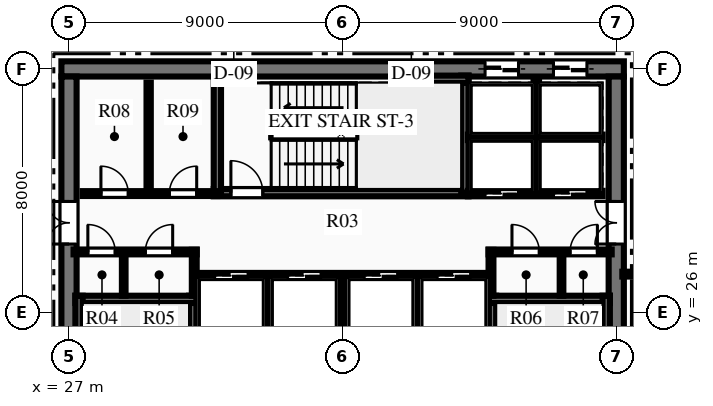
"""IFC4 building model, lengths in metres.
Left out: names, types, materials, properties, quantities, classifications, styles, units other than length and angle.
Written with IfcOpenShell. Run it as: python <this file> out.ifc"""

import sys

from ifc_helpers import new_model, si_unit, direction, frame, frame_2d, origin, place, context, subcontext, project, spatial, rectangle, extrude, element, fill, save


model = new_model("IFC4")
c1 = context("Model", 3, precision=1e-05, world=origin(), true_north=direction((0.0, 1.0)))
c2 = subcontext(c1, "Body", "Model", "MODEL_VIEW")
j1 = project(units=[si_unit("LENGTHUNIT", "METRE"), si_unit("PLANEANGLEUNIT", "RADIAN")], contexts=[c1])
p1 = place(None, origin())
s1 = spatial("IfcSite", under=j1, at=p1, CompositionType="ELEMENT")
p2 = place(p1, origin())
s2 = spatial("IfcBuilding", under=s1, at=p2, CompositionType="ELEMENT")
p3 = place(p2, frame((0.0, 0.0, 181.95)))
s3 = spatial("IfcBuildingStorey", under=s2, at=p3, CompositionType="ELEMENT", Elevation=181.95)
p4 = place(p3, frame((26.75, 34.0, 0.0), z_axis=(0.0, 0.0, 1.0), x_axis=(1.0, 0.0, 0.0)))
e1 = element("IfcWall", 1, at=p4, inside=s3, PredefinedType="SHEAR", context=c2, shape_type="SweptSolid", body=[
    extrude(rectangle(XDim=18.5, YDim=0.5, at=frame_2d((9.25, 0.0))), origin(), (0.0, 0.0, 1.0), 3.75),
])
p5 = place(p4, frame((13.935, 0.0, 0.0)))
e2 = element("IfcOpeningElement", 2, at=p5, cuts=e1, PredefinedType="OPENING", context=c2, shape_type="SweptSolid", body=[
    extrude(rectangle(XDim=1.1, YDim=2.15, at=frame_2d((0.55, 1.075))), frame((0.0, 0.26, 0.0), z_axis=(0.0, -1.0, 0.0), x_axis=(1.0, 0.0, 0.0)), (0.0, 0.0, 1.0), 0.52),
])
p6 = place(p4, frame((16.185, 0.0, 0.0)))
e3 = element("IfcOpeningElement", 3, at=p6, cuts=e1, PredefinedType="OPENING", context=c2, shape_type="SweptSolid", body=[
    extrude(rectangle(XDim=1.1, YDim=2.15, at=frame_2d((0.55, 1.075))), frame((0.0, 0.26, 0.0), z_axis=(0.0, -1.0, 0.0), x_axis=(1.0, 0.0, 0.0)), (0.0, 0.0, 1.0), 0.52),
])
p7 = place(p3, frame((27.0, 18.25, 0.0), z_axis=(0.0, 0.0, 1.0), x_axis=(0.0, 1.0, 0.0)))
e4 = element("IfcWall", 4, at=p7, inside=s3, PredefinedType="SHEAR", context=c2, shape_type="SweptSolid", body=[
    extrude(rectangle(XDim=15.5, YDim=0.5, at=frame_2d((7.75, 0.0))), origin(), (0.0, 0.0, 1.0), 3.75),
])
p8 = place(p7, frame((9.99, 0.0, 0.0)))
e5 = element("IfcOpeningElement", 5, at=p8, cuts=e4, PredefinedType="OPENING", context=c2, shape_type="SweptSolid", body=[
    extrude(rectangle(XDim=1.4, YDim=2.2, at=frame_2d((0.7, 1.1))), frame((0.0, 0.26, 0.0), z_axis=(0.0, -1.0, 0.0), x_axis=(1.0, 0.0, 0.0)), (0.0, 0.0, 1.0), 0.52),
])
p9 = place(p3, frame((45.0, 18.25, 0.0), z_axis=(0.0, 0.0, 1.0), x_axis=(0.0, 1.0, 0.0)))
e6 = element("IfcWall", 6, at=p9, inside=s3, PredefinedType="SHEAR", context=c2, shape_type="SweptSolid", body=[
    extrude(rectangle(XDim=15.5, YDim=0.5, at=frame_2d((7.75, 0.0))), origin(), (0.0, 0.0, 1.0), 3.75),
])
p10 = place(p9, frame((9.99, 0.0, 0.0)))
e7 = element("IfcOpeningElement", 7, at=p10, cuts=e6, PredefinedType="OPENING", context=c2, shape_type="SweptSolid", body=[
    extrude(rectangle(XDim=1.4, YDim=2.2, at=frame_2d((0.7, 1.1))), frame((0.0, 0.26, 0.0), z_axis=(0.0, -1.0, 0.0), x_axis=(1.0, 0.0, 0.0)), (0.0, 0.0, 1.0), 0.52),
])
p11 = place(p3, frame((31.07, 18.28, 0.0), z_axis=(0.0, 0.0, 1.0), x_axis=(0.0, 1.0, 0.0)))
e8 = element("IfcWall", 8, at=p11, inside=s3, PredefinedType="SHEAR", context=c2, shape_type="SweptSolid", body=[
    extrude(rectangle(XDim=8.26, YDim=0.24, at=frame_2d((4.13, 0.0))), origin(), (0.0, 0.0, 1.0), 3.75),
])
p12 = place(p11, frame((0.365, 0.0, 0.0)))
e9 = element("IfcOpeningElement", 9, at=p12, cuts=e8, PredefinedType="OPENING", context=c2, shape_type="SweptSolid", body=[
    extrude(rectangle(XDim=1.05, YDim=2.15, at=frame_2d((0.525, 1.075))), frame((0.0, 0.13, 0.0), z_axis=(0.0, -1.0, 0.0), x_axis=(1.0, 0.0, 0.0)), (0.0, 0.0, 1.0), 0.26),
])
p13 = place(p3, frame((27.21, 26.42, 0.0), z_axis=(0.0, 0.0, 1.0), x_axis=(1.0, 0.0, 0.0)))
e10 = element("IfcWall", 10, at=p13, inside=s3, PredefinedType="SHEAR", context=c2, shape_type="SweptSolid", body=[
    extrude(rectangle(XDim=3.98, YDim=0.24, at=frame_2d((1.99, 0.0))), origin(), (0.0, 0.0, 1.0), 3.75),
])
p14 = place(p3, frame((27.33, 18.28, 0.0), z_axis=(0.0, 0.0, 1.0), x_axis=(0.0, 1.0, 0.0)))
e11 = element("IfcWall", 11, at=p14, inside=s3, PredefinedType="SHEAR", context=c2, shape_type="SweptSolid", body=[
    extrude(rectangle(XDim=8.26, YDim=0.24, at=frame_2d((4.13, 0.0))), origin(), (0.0, 0.0, 1.0), 3.75),
])
p15 = place(p3, frame((40.93, 18.28, 0.0), z_axis=(0.0, 0.0, 1.0), x_axis=(0.0, 1.0, 0.0)))
e12 = element("IfcWall", 12, at=p15, inside=s3, PredefinedType="SHEAR", context=c2, shape_type="SweptSolid", body=[
    extrude(rectangle(XDim=8.26, YDim=0.24, at=frame_2d((4.13, 0.0))), origin(), (0.0, 0.0, 1.0), 3.75),
])
p16 = place(p15, frame((0.365, 0.0, 0.0)))
e13 = element("IfcOpeningElement", 13, at=p16, cuts=e12, PredefinedType="OPENING", context=c2, shape_type="SweptSolid", body=[
    extrude(rectangle(XDim=1.05, YDim=2.15, at=frame_2d((0.525, 1.075))), frame((0.0, 0.13, 0.0), z_axis=(0.0, -1.0, 0.0), x_axis=(1.0, 0.0, 0.0)), (0.0, 0.0, 1.0), 0.26),
])
p17 = place(p3, frame((40.81, 26.42, 0.0), z_axis=(0.0, 0.0, 1.0), x_axis=(1.0, 0.0, 0.0)))
e14 = element("IfcWall", 14, at=p17, inside=s3, PredefinedType="SHEAR", context=c2, shape_type="SweptSolid", body=[
    extrude(rectangle(XDim=3.98, YDim=0.24, at=frame_2d((1.99, 0.0))), origin(), (0.0, 0.0, 1.0), 3.75),
])
p18 = place(p3, frame((44.67, 18.28, 0.0), z_axis=(0.0, 0.0, 1.0), x_axis=(0.0, 1.0, 0.0)))
e15 = element("IfcWall", 15, at=p18, inside=s3, PredefinedType="SHEAR", context=c2, shape_type="SweptSolid", body=[
    extrude(rectangle(XDim=8.26, YDim=0.24, at=frame_2d((4.13, 0.0))), origin(), (0.0, 0.0, 1.0), 3.75),
])
p19 = place(p3, frame((31.76, 29.93, 0.0), z_axis=(0.0, 0.0, 1.0), x_axis=(1.0, 0.0, 0.0)))
e16 = element("IfcWall", 16, at=p19, inside=s3, PredefinedType="SHEAR", context=c2, shape_type="SweptSolid", body=[
    extrude(rectangle(XDim=8.38, YDim=0.24, at=frame_2d((4.19, 0.0))), origin(), (0.0, 0.0, 1.0), 3.75),
])
p20 = place(p19, frame((0.565, 0.0, 0.0)))
e17 = element("IfcOpeningElement", 17, at=p20, cuts=e16, PredefinedType="OPENING", context=c2, shape_type="SweptSolid", body=[
    extrude(rectangle(XDim=1.05, YDim=2.15, at=frame_2d((0.525, 1.075))), frame((0.0, 0.13, 0.0), z_axis=(0.0, -1.0, 0.0), x_axis=(1.0, 0.0, 0.0)), (0.0, 0.0, 1.0), 0.26),
])
p21 = place(p3, frame((31.88, 29.93, 0.0), z_axis=(0.0, 0.0, 1.0), x_axis=(0.0, 1.0, 0.0)))
e18 = element("IfcWall", 18, at=p21, inside=s3, PredefinedType="SHEAR", context=c2, shape_type="SweptSolid", body=[
    extrude(rectangle(XDim=3.79, YDim=0.24, at=frame_2d((1.895, 0.0))), origin(), (0.0, 0.0, 1.0), 3.75),
])
p22 = place(p3, frame((40.02, 29.93, 0.0), z_axis=(0.0, 0.0, 1.0), x_axis=(0.0, 1.0, 0.0)))
e19 = element("IfcWall", 19, at=p22, inside=s3, PredefinedType="SHEAR", context=c2, shape_type="SweptSolid", body=[
    extrude(rectangle(XDim=3.85, YDim=0.24, at=frame_2d((1.925, 0.0))), origin(), (0.0, 0.0, 1.0), 3.75),
])
p23 = place(p3, frame((37.85, 33.66, 0.0), z_axis=(0.0, 0.0, 1.0), x_axis=(1.0, 0.0, 0.0)))
e20 = element("IfcWall", 20, at=p23, inside=s3, PredefinedType="SHEAR", context=c2, shape_type="SweptSolid", body=[
    extrude(rectangle(XDim=2.29, YDim=0.24, at=frame_2d((1.145, 0.0))), origin(), (0.0, 0.0, 1.0), 3.75),
])
p24 = place(p3, frame((27.15, 27.98, 0.0), z_axis=(0.0, 0.0, 1.0), x_axis=(1.0, 0.0, 0.0)))
e21 = element("IfcWall", 21, at=p24, inside=s3, PredefinedType="PARTITIONING", context=c2, shape_type="SweptSolid", body=[
    extrude(rectangle(XDim=4.05, YDim=0.16, at=frame_2d((2.025, 0.0))), origin(), (0.0, 0.0, 1.0), 3.46),
])
p25 = place(p24, frame((0.47, 0.0, 0.0)))
e22 = element("IfcOpeningElement", 22, at=p25, cuts=e21, PredefinedType="OPENING", context=c2, shape_type="SweptSolid", body=[
    extrude(rectangle(XDim=0.9, YDim=2.15, at=frame_2d((0.45, 1.075))), frame((0.0, 0.09, 0.0), z_axis=(0.0, -1.0, 0.0), x_axis=(1.0, 0.0, 0.0)), (0.0, 0.0, 1.0), 0.18),
])
p26 = place(p24, frame((2.36, 0.0, 0.0)))
e23 = element("IfcOpeningElement", 23, at=p26, cuts=e21, PredefinedType="OPENING", context=c2, shape_type="SweptSolid", body=[
    extrude(rectangle(XDim=0.9, YDim=2.15, at=frame_2d((0.45, 1.075))), frame((0.0, 0.09, 0.0), z_axis=(0.0, -1.0, 0.0), x_axis=(1.0, 0.0, 0.0)), (0.0, 0.0, 1.0), 0.18),
])
p27 = place(p3, frame((31.12, 26.54, 0.0), z_axis=(0.0, 0.0, 1.0), x_axis=(0.0, 1.0, 0.0)))
e24 = element("IfcWall", 24, at=p27, inside=s3, PredefinedType="PARTITIONING", context=c2, shape_type="SweptSolid", body=[
    extrude(rectangle(XDim=1.51, YDim=0.16, at=frame_2d((0.755, 0.0))), origin(), (0.0, 0.0, 1.0), 3.46),
])
p28 = place(p3, frame((40.8, 27.98, 0.0), z_axis=(0.0, 0.0, 1.0), x_axis=(1.0, 0.0, 0.0)))
e25 = element("IfcWall", 25, at=p28, inside=s3, PredefinedType="PARTITIONING", context=c2, shape_type="SweptSolid", body=[
    extrude(rectangle(XDim=4.05, YDim=0.16, at=frame_2d((2.025, 0.0))), origin(), (0.0, 0.0, 1.0), 3.46),
])
p29 = place(p28, frame((0.77, 0.0, 0.0)))
e26 = element("IfcOpeningElement", 26, at=p29, cuts=e25, PredefinedType="OPENING", context=c2, shape_type="SweptSolid", body=[
    extrude(rectangle(XDim=0.9, YDim=2.15, at=frame_2d((0.45, 1.075))), frame((0.0, 0.09, 0.0), z_axis=(0.0, -1.0, 0.0), x_axis=(1.0, 0.0, 0.0)), (0.0, 0.0, 1.0), 0.18),
])
p30 = place(p28, frame((2.68, 0.0, 0.0)))
e27 = element("IfcOpeningElement", 27, at=p30, cuts=e25, PredefinedType="OPENING", context=c2, shape_type="SweptSolid", body=[
    extrude(rectangle(XDim=0.9, YDim=2.15, at=frame_2d((0.45, 1.075))), frame((0.0, 0.09, 0.0), z_axis=(0.0, -1.0, 0.0), x_axis=(1.0, 0.0, 0.0)), (0.0, 0.0, 1.0), 0.18),
])
p31 = place(p3, frame((40.88, 26.54, 0.0), z_axis=(0.0, 0.0, 1.0), x_axis=(0.0, 1.0, 0.0)))
e28 = element("IfcWall", 28, at=p31, inside=s3, PredefinedType="PARTITIONING", context=c2, shape_type="SweptSolid", body=[
    extrude(rectangle(XDim=1.51, YDim=0.16, at=frame_2d((0.755, 0.0))), origin(), (0.0, 0.0, 1.0), 3.46),
])
for number, where, z_axis, x_axis in (
    (29, (28.8, 26.54, 0.0), (0.0, 0.0, 1.0), (0.0, 1.0, 0.0)),
    (30, (43.2, 26.54, 0.0), (0.0, 0.0, 1.0), (0.0, 1.0, 0.0)),
):
    element("IfcWall", number, at=place(p3, frame(where, z_axis=z_axis, x_axis=x_axis)), inside=s3, PredefinedType="PARTITIONING", context=c2, shape_type="SweptSolid", body=[
        extrude(rectangle(XDim=1.44, YDim=0.12, at=frame_2d((0.72, 0.0))), origin(), (0.0, 0.0, 1.0), 3.46),
    ])
p32 = place(p3, frame((27.45, 29.9, 0.0), z_axis=(0.0, 0.0, 1.0), x_axis=(1.0, 0.0, 0.0)))
e31 = element("IfcWall", 31, at=p32, inside=s3, PredefinedType="PARTITIONING", context=c2, shape_type="SweptSolid", body=[
    extrude(rectangle(XDim=4.43, YDim=0.16, at=frame_2d((2.215, 0.0))), origin(), (0.0, 0.0, 1.0), 3.46),
])
p33 = place(p32, frame((0.6, 0.0, 0.0)))
e32 = element("IfcOpeningElement", 32, at=p33, cuts=e31, PredefinedType="OPENING", context=c2, shape_type="SweptSolid", body=[
    extrude(rectangle(XDim=0.9, YDim=2.15, at=frame_2d((0.45, 1.075))), frame((0.0, 0.09, 0.0), z_axis=(0.0, -1.0, 0.0), x_axis=(1.0, 0.0, 0.0)), (0.0, 0.0, 1.0), 0.18),
])
p34 = place(p32, frame((2.85, 0.0, 0.0)))
e33 = element("IfcOpeningElement", 33, at=p34, cuts=e31, PredefinedType="OPENING", context=c2, shape_type="SweptSolid", body=[
    extrude(rectangle(XDim=0.9, YDim=2.15, at=frame_2d((0.45, 1.075))), frame((0.0, 0.09, 0.0), z_axis=(0.0, -1.0, 0.0), x_axis=(1.0, 0.0, 0.0)), (0.0, 0.0, 1.0), 0.18),
])
p35 = place(p3, frame((29.62, 29.95, 0.0), z_axis=(0.0, 0.0, 1.0), x_axis=(0.0, 1.0, 0.0)))
e34 = element("IfcWall", 34, at=p35, inside=s3, PredefinedType="PARTITIONING", context=c2, shape_type="SweptSolid", body=[
    extrude(rectangle(XDim=3.6, YDim=0.14, at=frame_2d((1.8, 0.0))), origin(), (0.0, 0.0, 1.0), 3.46),
])
p36 = place(p3, frame((40.12, 29.9, 0.0), z_axis=(0.0, 0.0, 1.0), x_axis=(1.0, 0.0, 0.0)))
e35 = element("IfcWall", 35, at=p36, inside=s3, PredefinedType="PARTITIONING", context=c2, shape_type="SweptSolid", body=[
    extrude(rectangle(XDim=4.43, YDim=0.18, at=frame_2d((2.215, 0.0))), origin(), (0.0, 0.0, 1.0), 3.46),
])
p37 = place(p36, frame((0.565, 0.0, 0.0)))
e36 = element("IfcOpeningElement", 36, at=p37, cuts=e35, PredefinedType="OPENING", context=c2, shape_type="SweptSolid", body=[
    extrude(rectangle(XDim=1.1, YDim=2.15, at=frame_2d((0.55, 1.075))), frame((0.0, 0.1, 0.0), z_axis=(0.0, -1.0, 0.0), x_axis=(1.0, 0.0, 0.0)), (0.0, 0.0, 1.0), 0.2),
])
p38 = place(p36, frame((2.815, 0.0, 0.0)))
e37 = element("IfcOpeningElement", 37, at=p38, cuts=e35, PredefinedType="OPENING", context=c2, shape_type="SweptSolid", body=[
    extrude(rectangle(XDim=1.1, YDim=2.15, at=frame_2d((0.55, 1.075))), frame((0.0, 0.1, 0.0), z_axis=(0.0, -1.0, 0.0), x_axis=(1.0, 0.0, 0.0)), (0.0, 0.0, 1.0), 0.2),
])
p39 = place(p3, frame((40.12, 31.75, 0.0), z_axis=(0.0, 0.0, 1.0), x_axis=(1.0, 0.0, 0.0)))
e38 = element("IfcWall", 38, at=p39, inside=s3, PredefinedType="PARTITIONING", context=c2, shape_type="SweptSolid", body=[
    extrude(rectangle(XDim=4.43, YDim=0.18, at=frame_2d((2.215, 0.0))), origin(), (0.0, 0.0, 1.0), 3.46),
])
p40 = place(p3, frame((42.37, 29.9, 0.0), z_axis=(0.0, 0.0, 1.0), x_axis=(0.0, 1.0, 0.0)))
e39 = element("IfcWall", 39, at=p40, inside=s3, PredefinedType="PARTITIONING", context=c2, shape_type="SweptSolid", body=[
    extrude(rectangle(XDim=3.75, YDim=0.18, at=frame_2d((1.875, 0.0))), origin(), (0.0, 0.0, 1.0), 3.46),
])
p41 = place(p3, frame((31.2, 27.2, 0.0), z_axis=(0.0, 0.0, 1.0), x_axis=(1.0, 0.0, 0.0)))
e40 = element("IfcWall", 40, at=p41, inside=s3, PredefinedType="PARTITIONING", context=c2, shape_type="SweptSolid", body=[
    extrude(rectangle(XDim=9.6, YDim=0.18, at=frame_2d((4.8, 0.0))), origin(), (0.0, 0.0, 1.0), 3.46),
])
p42 = place(p41, frame((0.59, 0.0, 0.0)))
e41 = element("IfcOpeningElement", 41, at=p42, cuts=e40, PredefinedType="OPENING", context=c2, shape_type="SweptSolid", body=[
    extrude(rectangle(XDim=1.1, YDim=2.15, at=frame_2d((0.55, 1.075))), frame((0.0, 0.1, 0.0), z_axis=(0.0, -1.0, 0.0), x_axis=(1.0, 0.0, 0.0)), (0.0, 0.0, 1.0), 0.2),
])
p43 = place(p41, frame((2.99, 0.0, 0.0)))
e42 = element("IfcOpeningElement", 42, at=p43, cuts=e40, PredefinedType="OPENING", context=c2, shape_type="SweptSolid", body=[
    extrude(rectangle(XDim=1.1, YDim=2.15, at=frame_2d((0.55, 1.075))), frame((0.0, 0.1, 0.0), z_axis=(0.0, -1.0, 0.0), x_axis=(1.0, 0.0, 0.0)), (0.0, 0.0, 1.0), 0.2),
])
p44 = place(p41, frame((5.51, 0.0, 0.0)))
e43 = element("IfcOpeningElement", 43, at=p44, cuts=e40, PredefinedType="OPENING", context=c2, shape_type="SweptSolid", body=[
    extrude(rectangle(XDim=1.1, YDim=2.15, at=frame_2d((0.55, 1.075))), frame((0.0, 0.1, 0.0), z_axis=(0.0, -1.0, 0.0), x_axis=(1.0, 0.0, 0.0)), (0.0, 0.0, 1.0), 0.2),
])
p45 = place(p41, frame((7.91, 0.0, 0.0)))
e44 = element("IfcOpeningElement", 44, at=p45, cuts=e40, PredefinedType="OPENING", context=c2, shape_type="SweptSolid", body=[
    extrude(rectangle(XDim=1.1, YDim=2.15, at=frame_2d((0.55, 1.075))), frame((0.0, 0.1, 0.0), z_axis=(0.0, -1.0, 0.0), x_axis=(1.0, 0.0, 0.0)), (0.0, 0.0, 1.0), 0.2),
])
for number, where, z_axis, x_axis in (
    (45, (33.54, 25.3, 0.0), (0.0, 0.0, 1.0), (0.0, 1.0, 0.0)),
    (46, (36.0, 25.3, 0.0), (0.0, 0.0, 1.0), (0.0, 1.0, 0.0)),
    (47, (38.46, 25.3, 0.0), (0.0, 0.0, 1.0), (0.0, 1.0, 0.0)),
):
    element("IfcWall", number, at=place(p3, frame(where, z_axis=z_axis, x_axis=x_axis)), inside=s3, PredefinedType="PARTITIONING", context=c2, shape_type="SweptSolid", body=[
        extrude(rectangle(XDim=1.9, YDim=0.18, at=frame_2d((0.95, 0.0))), origin(), (0.0, 0.0, 1.0), 3.46),
    ])
p46 = place(p3, frame((45.2, 27.25, 0.0), z_axis=(0.0, 0.0, 1.0), x_axis=(1.0, 0.0, 0.0)))
e48 = element("IfcWall", 48, at=p46, inside=s3, PredefinedType="PARTITIONING", context=c2, shape_type="SweptSolid", body=[
    extrude(rectangle(XDim=2.25, YDim=0.16, at=frame_2d((1.125, 0.0))), origin(), (0.0, 0.0, 1.0), 3.46),
])
p47 = place(p25, origin())
e49 = element("IfcDoor", 49, at=p47, inside=s3, OperationType="SINGLE_SWING_LEFT", PredefinedType="DOOR", context=c2, shape_type="SweptSolid", body=[
    extrude(rectangle(XDim=0.9, YDim=2.15, at=frame_2d((0.45, 1.075))), frame((0.0, 0.025, 0.0), z_axis=(0.0, -1.0, 0.0), x_axis=(1.0, 0.0, 0.0)), (0.0, 0.0, 1.0), 0.05),
])
fill(e22, e49)
p48 = place(p26, origin())
e50 = element("IfcDoor", 50, at=p48, inside=s3, OperationType="SINGLE_SWING_RIGHT", PredefinedType="DOOR", context=c2, shape_type="SweptSolid", body=[
    extrude(rectangle(XDim=0.9, YDim=2.15, at=frame_2d((0.45, 1.075))), frame((0.0, 0.025, 0.0), z_axis=(0.0, -1.0, 0.0), x_axis=(1.0, 0.0, 0.0)), (0.0, 0.0, 1.0), 0.05),
])
fill(e23, e50)
p49 = place(p29, origin())
e51 = element("IfcDoor", 51, at=p49, inside=s3, OperationType="SINGLE_SWING_LEFT", PredefinedType="DOOR", context=c2, shape_type="SweptSolid", body=[
    extrude(rectangle(XDim=0.9, YDim=2.15, at=frame_2d((0.45, 1.075))), frame((0.0, 0.025, 0.0), z_axis=(0.0, -1.0, 0.0), x_axis=(1.0, 0.0, 0.0)), (0.0, 0.0, 1.0), 0.05),
])
fill(e26, e51)
p50 = place(p30, origin())
e52 = element("IfcDoor", 52, at=p50, inside=s3, OperationType="SINGLE_SWING_RIGHT", PredefinedType="DOOR", context=c2, shape_type="SweptSolid", body=[
    extrude(rectangle(XDim=0.9, YDim=2.15, at=frame_2d((0.45, 1.075))), frame((0.0, 0.025, 0.0), z_axis=(0.0, -1.0, 0.0), x_axis=(1.0, 0.0, 0.0)), (0.0, 0.0, 1.0), 0.05),
])
fill(e27, e52)
p51 = place(p33, origin())
e53 = element("IfcDoor", 53, at=p51, inside=s3, OperationType="SINGLE_SWING_LEFT", PredefinedType="DOOR", context=c2, shape_type="SweptSolid", body=[
    extrude(rectangle(XDim=0.9, YDim=2.15, at=frame_2d((0.45, 1.075))), frame((0.0, 0.025, 0.0), z_axis=(0.0, -1.0, 0.0), x_axis=(1.0, 0.0, 0.0)), (0.0, 0.0, 1.0), 0.05),
])
fill(e32, e53)
p52 = place(p34, origin())
e54 = element("IfcDoor", 54, at=p52, inside=s3, OperationType="SINGLE_SWING_RIGHT", PredefinedType="DOOR", context=c2, shape_type="SweptSolid", body=[
    extrude(rectangle(XDim=0.9, YDim=2.15, at=frame_2d((0.45, 1.075))), frame((0.0, 0.025, 0.0), z_axis=(0.0, -1.0, 0.0), x_axis=(1.0, 0.0, 0.0)), (0.0, 0.0, 1.0), 0.05),
])
fill(e33, e54)
p53 = place(p20, origin())
e55 = element("IfcDoor", 55, at=p53, inside=s3, OperationType="SINGLE_SWING_LEFT", PredefinedType="DOOR", context=c2, shape_type="SweptSolid", body=[
    extrude(rectangle(XDim=1.05, YDim=2.15, at=frame_2d((0.525, 1.075))), frame((0.0, 0.025, 0.0), z_axis=(0.0, -1.0, 0.0), x_axis=(1.0, 0.0, 0.0)), (0.0, 0.0, 1.0), 0.05),
])
fill(e17, e55)
p54 = place(p8, origin())
e56 = element("IfcDoor", 56, at=p54, inside=s3, OperationType="DOUBLE_DOOR_SINGLE_SWING", PredefinedType="DOOR", context=c2, shape_type="SweptSolid", body=[
    extrude(rectangle(XDim=1.4, YDim=2.2, at=frame_2d((0.7, 1.1))), frame((0.0, 0.025, 0.0), z_axis=(0.0, -1.0, 0.0), x_axis=(1.0, 0.0, 0.0)), (0.0, 0.0, 1.0), 0.05),
])
fill(e5, e56)
p55 = place(p10, origin())
e57 = element("IfcDoor", 57, at=p55, inside=s3, OperationType="DOUBLE_DOOR_SINGLE_SWING", PredefinedType="DOOR", context=c2, shape_type="SweptSolid", body=[
    extrude(rectangle(XDim=1.4, YDim=2.2, at=frame_2d((0.7, 1.1))), frame((0.0, 0.025, 0.0), z_axis=(0.0, -1.0, 0.0), x_axis=(1.0, 0.0, 0.0)), (0.0, 0.0, 1.0), 0.05),
])
fill(e7, e57)
p56 = place(p37, origin())
e58 = element("IfcDoor", 58, at=p56, inside=s3, OperationType="SLIDING_TO_LEFT", PredefinedType="DOOR", context=c2, shape_type="SweptSolid", body=[
    extrude(rectangle(XDim=1.1, YDim=2.15, at=frame_2d((0.55, 1.075))), frame((0.0, 0.025, 0.0), z_axis=(0.0, -1.0, 0.0), x_axis=(1.0, 0.0, 0.0)), (0.0, 0.0, 1.0), 0.05),
])
fill(e36, e58)
p57 = place(p38, origin())
e59 = element("IfcDoor", 59, at=p57, inside=s3, OperationType="SLIDING_TO_LEFT", PredefinedType="DOOR", context=c2, shape_type="SweptSolid", body=[
    extrude(rectangle(XDim=1.1, YDim=2.15, at=frame_2d((0.55, 1.075))), frame((0.0, 0.025, 0.0), z_axis=(0.0, -1.0, 0.0), x_axis=(1.0, 0.0, 0.0)), (0.0, 0.0, 1.0), 0.05),
])
fill(e37, e59)
p58 = place(p5, origin())
e60 = element("IfcDoor", 60, at=p58, inside=s3, OperationType="SLIDING_TO_LEFT", PredefinedType="DOOR", context=c2, shape_type="SweptSolid", body=[
    extrude(rectangle(XDim=1.1, YDim=2.15, at=frame_2d((0.55, 1.075))), frame((0.0, 0.025, 0.0), z_axis=(0.0, -1.0, 0.0), x_axis=(1.0, 0.0, 0.0)), (0.0, 0.0, 1.0), 0.05),
])
fill(e2, e60)
p59 = place(p6, origin())
e61 = element("IfcDoor", 61, at=p59, inside=s3, OperationType="SLIDING_TO_LEFT", PredefinedType="DOOR", context=c2, shape_type="SweptSolid", body=[
    extrude(rectangle(XDim=1.1, YDim=2.15, at=frame_2d((0.55, 1.075))), frame((0.0, 0.025, 0.0), z_axis=(0.0, -1.0, 0.0), x_axis=(1.0, 0.0, 0.0)), (0.0, 0.0, 1.0), 0.05),
])
fill(e3, e61)
p60 = place(p42, origin())
e62 = element("IfcDoor", 62, at=p60, inside=s3, OperationType="SLIDING_TO_LEFT", PredefinedType="DOOR", context=c2, shape_type="SweptSolid", body=[
    extrude(rectangle(XDim=1.1, YDim=2.15, at=frame_2d((0.55, 1.075))), frame((0.0, 0.025, 0.0), z_axis=(0.0, -1.0, 0.0), x_axis=(1.0, 0.0, 0.0)), (0.0, 0.0, 1.0), 0.05),
])
fill(e41, e62)
p61 = place(p43, origin())
e63 = element("IfcDoor", 63, at=p61, inside=s3, OperationType="SLIDING_TO_LEFT", PredefinedType="DOOR", context=c2, shape_type="SweptSolid", body=[
    extrude(rectangle(XDim=1.1, YDim=2.15, at=frame_2d((0.55, 1.075))), frame((0.0, 0.025, 0.0), z_axis=(0.0, -1.0, 0.0), x_axis=(1.0, 0.0, 0.0)), (0.0, 0.0, 1.0), 0.05),
])
fill(e42, e63)
p62 = place(p44, origin())
e64 = element("IfcDoor", 64, at=p62, inside=s3, OperationType="SLIDING_TO_LEFT", PredefinedType="DOOR", context=c2, shape_type="SweptSolid", body=[
    extrude(rectangle(XDim=1.1, YDim=2.15, at=frame_2d((0.55, 1.075))), frame((0.0, 0.025, 0.0), z_axis=(0.0, -1.0, 0.0), x_axis=(1.0, 0.0, 0.0)), (0.0, 0.0, 1.0), 0.05),
])
fill(e43, e64)
p63 = place(p45, origin())
e65 = element("IfcDoor", 65, at=p63, inside=s3, OperationType="SLIDING_TO_LEFT", PredefinedType="DOOR", context=c2, shape_type="SweptSolid", body=[
    extrude(rectangle(XDim=1.1, YDim=2.15, at=frame_2d((0.55, 1.075))), frame((0.0, 0.025, 0.0), z_axis=(0.0, -1.0, 0.0), x_axis=(1.0, 0.0, 0.0)), (0.0, 0.0, 1.0), 0.05),
])
fill(e44, e65)
save(model, sys.argv[1])
